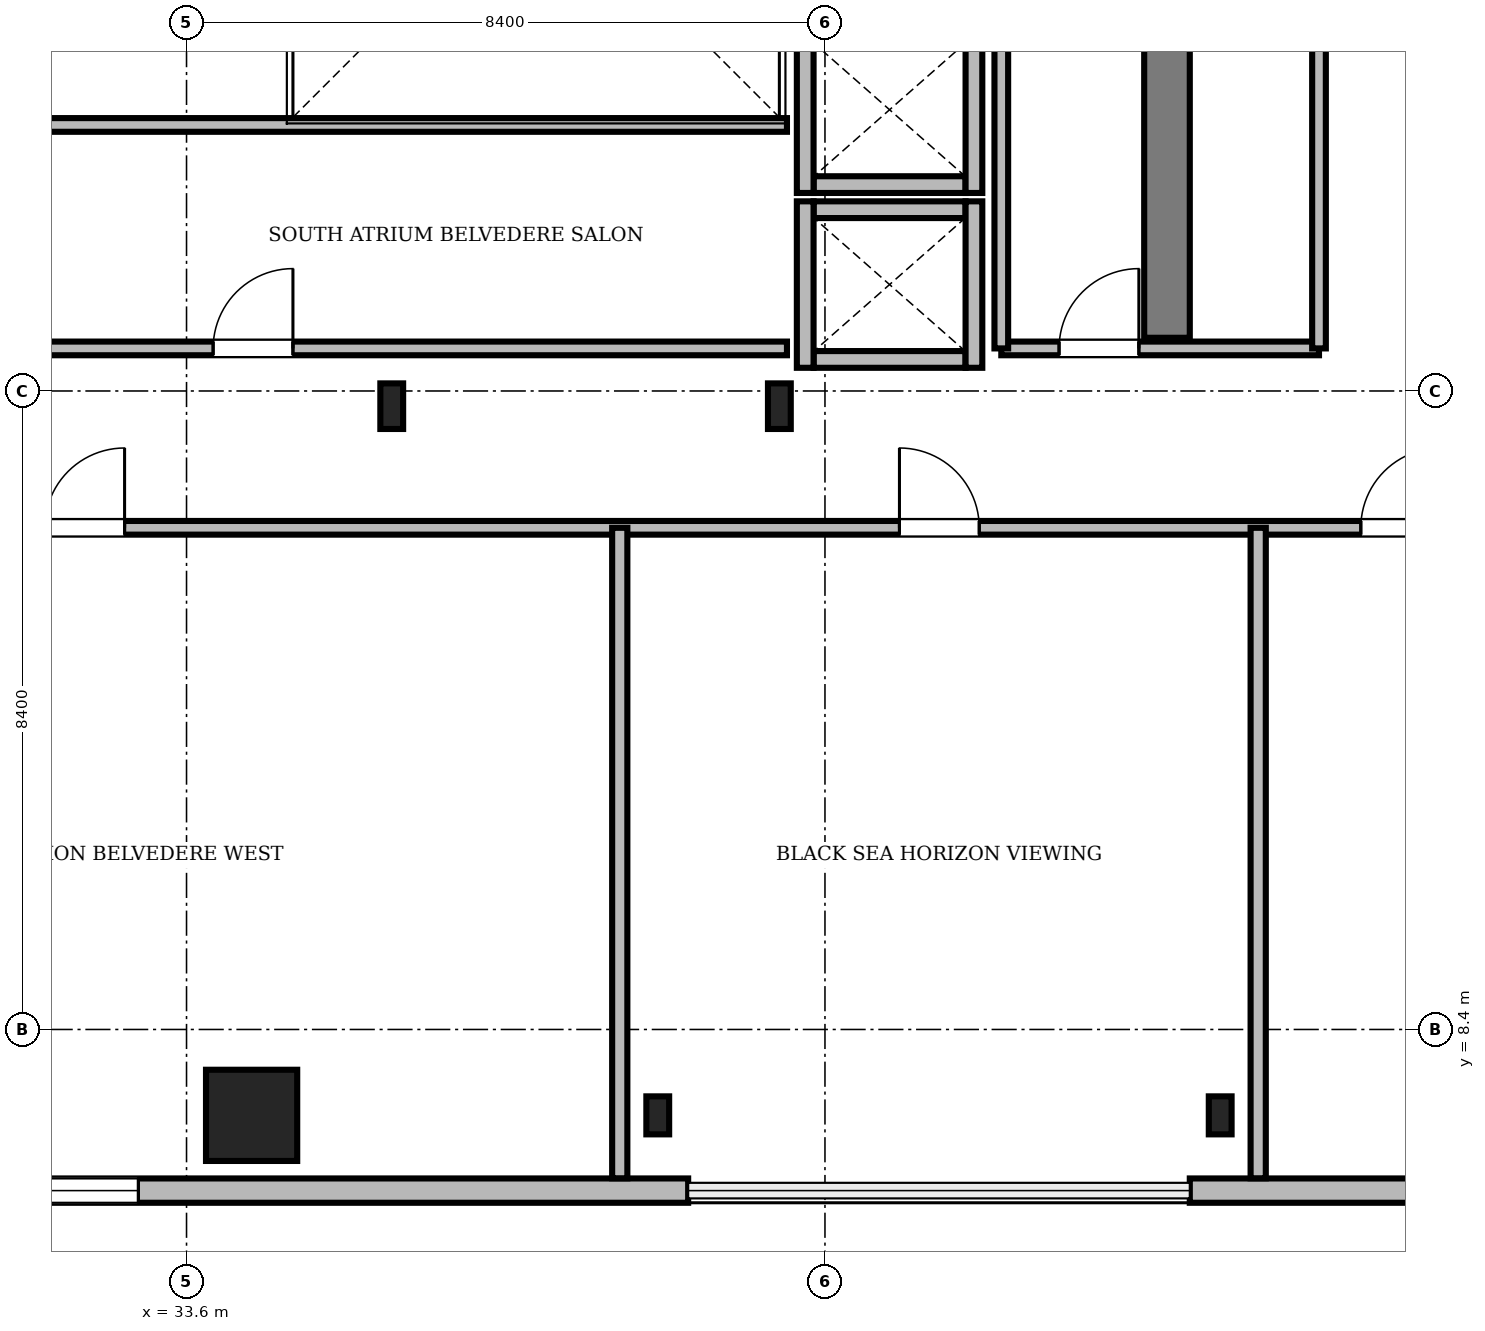
"""IFC4 building model, lengths in metres.
Left out: names, types, materials, properties, quantities, classifications, styles, units other than length and angle.
Written with IfcOpenShell. Run it as: python <this file> out.ifc"""

import sys

from ifc_helpers import new_model, si_unit, direction, frame, frame_2d, origin, origin_2d, place, context, subcontext, project, spatial, rectangle, i_section, extrude, source, transform, mapped, element, fill, save


model = new_model("IFC4")
c1 = context("Model", 3, precision=1e-05, world=origin(), true_north=direction((0.0, 1.0)))
c2 = subcontext(c1, "Body", "Model", "MODEL_VIEW")
j1 = project(units=[si_unit("LENGTHUNIT", "METRE"), si_unit("PLANEANGLEUNIT", "RADIAN")], contexts=[c1])
p1 = place(None, origin())
s1 = spatial("IfcSite", under=j1, at=p1, CompositionType="ELEMENT")
p2 = place(p1, origin())
s2 = spatial("IfcBuilding", under=s1, at=p2, CompositionType="ELEMENT")
p3 = place(p2, frame((0.0, 0.0, 286.15)))
s3 = spatial("IfcBuildingStorey", under=s2, at=p3, CompositionType="ELEMENT", Elevation=286.15)
m1 = source(origin(), c2, "Body", "SweptSolid", [
    extrude(rectangle(XDim=13.15, YDim=0.6, at=frame_2d((6.575, 0.0))), origin(), (0.0, 0.0, 1.0), 4.7),
])
p4 = place(p3, frame((46.5, 17.5, 0.0), z_axis=(0.0, 0.0, 1.0), x_axis=(0.0, 1.0, 0.0)))
e1 = element("IfcWall", 1, at=p4, inside=s3, PredefinedType="SHEAR", context=c2, shape_type="MappedRepresentation", body=[
    mapped(m1, transform((0.0, 0.0, 0.0), scale=1.0)),
])
m2 = source(origin(), c2, "Body", "SweptSolid", [
    extrude(i_section(OverallWidth=0.3, OverallDepth=0.6, WebThickness=0.015, FlangeThickness=0.03, FilletRadius=0.027, at=origin_2d()), origin(), (0.0, 0.0, 1.0), 4.7),
])
for number, where, z_axis, x_axis in (
    (2, (36.3, 16.6, 0.0), (0.0, 0.0, 1.0), (1.0, 0.0, 0.0)),
    (3, (41.4, 16.6, 0.0), (0.0, 0.0, 1.0), (1.0, 0.0, 0.0)),
):
    element("IfcColumn", number, at=place(p3, frame(where, z_axis=z_axis, x_axis=x_axis)), inside=s3, PredefinedType="COLUMN", context=c2, shape_type="MappedRepresentation", body=[
        mapped(m2, transform((0.0, 0.0, 0.0), scale=1.0)),
    ])
m3 = source(origin(), c2, "Body", "SweptSolid", [
    extrude(rectangle(XDim=1.2, YDim=1.2, at=origin_2d()), origin(), (0.0, 0.0, 1.0), 4.738),
])
p5 = place(p3, frame((34.456, 7.27, 0.0), z_axis=(0.053949820104, 0.113979944671, 0.992017131467), x_axis=(-0.90386260457, 0.427822851259, 0.0)))
e4 = element("IfcColumn", 4, at=p5, inside=s3, PredefinedType="COLUMN", context=c2, shape_type="MappedRepresentation", body=[
    mapped(m3, transform((0.0, 0.0, 0.0), scale=1.0)),
])
m4 = source(origin(), c2, "Body", "SweptSolid", [
    extrude(i_section(OverallWidth=0.3, OverallDepth=0.5, WebThickness=0.014, FlangeThickness=0.028, FilletRadius=0.027, at=origin_2d()), origin(), (0.0, 0.0, 1.0), 4.731),
])
for number, where, z_axis, x_axis in (
    (5, (39.8, 7.27, 0.0), (0.0, 0.114, 0.993), (-1.0, 0.0, 0.0)),
    (6, (47.2, 7.27, 0.0), (0.0, 0.114, 0.993), (-1.0, 0.0, 0.0)),
):
    element("IfcColumn", number, at=place(p3, frame(where, z_axis=z_axis, x_axis=x_axis)), inside=s3, PredefinedType="COLUMN", context=c2, shape_type="MappedRepresentation", body=[
        mapped(m4, transform((0.0, 0.0, 0.0), scale=1.0)),
    ])
m5 = source(origin(), c2, "Body", "SweptSolid", [
    extrude(rectangle(XDim=11.773, YDim=0.32, at=frame_2d((5.886, 0.0))), origin(), (0.0, 0.0, 1.0), 4.7),
])
p6 = place(p3, frame((28.427, 6.28, 0.0), z_axis=(0.0, 0.0, 1.0), x_axis=(1.0, 0.0, 0.0)))
e7 = element("IfcWall", 7, at=p6, inside=s3, PredefinedType="SOLIDWALL", context=c2, shape_type="MappedRepresentation", body=[
    mapped(m5, transform((0.0, 0.0, 0.0), scale=1.0)),
])
m6 = source(origin(), c2, "Body", "SweptSolid", [
    extrude(rectangle(XDim=2.4, YDim=3.2, at=frame_2d((1.2, 1.6))), frame((0.0, 0.17, 0.0), z_axis=(0.0, -1.0, 0.0), x_axis=(1.0, 0.0, 0.0)), (0.0, 0.0, 1.0), 0.34),
])
p7 = place(p6, frame((2.14, 0.0, 0.72)))
e8 = element("IfcOpeningElement", 8, at=p7, cuts=e7, PredefinedType="OPENING", context=c2, shape_type="MappedRepresentation", body=[
    mapped(m6, transform((0.0, 0.0, 0.0), scale=1.0)),
])
p8 = place(p3, frame((46.8, 6.28, 0.0), z_axis=(0.0, 0.0, 1.0), x_axis=(1.0, 0.0, 0.0)))
e9 = element("IfcWall", 9, at=p8, inside=s3, PredefinedType="SOLIDWALL", context=c2, shape_type="MappedRepresentation", body=[
    mapped(m5, transform((0.0, 0.0, 0.0), scale=1.0)),
])
p9 = place(p8, frame((7.233, 0.0, 0.72)))
e10 = element("IfcOpeningElement", 10, at=p9, cuts=e9, PredefinedType="OPENING", context=c2, shape_type="MappedRepresentation", body=[
    mapped(m6, transform((0.0, 0.0, 0.0), scale=1.0)),
])
m7 = source(origin(), c2, "Body", "SweptSolid", [
    extrude(rectangle(XDim=2.0, YDim=0.22, at=frame_2d((1.0, 0.0))), origin(), (0.0, 0.0, 1.0), 4.7),
])
p10 = place(p3, frame((41.85, 19.515, 0.0), z_axis=(0.0, 0.0, 1.0), x_axis=(1.0, 0.0, 0.0)))
e11 = element("IfcWall", 11, at=p10, inside=s3, PredefinedType="SOLIDWALL", context=c2, shape_type="MappedRepresentation", body=[
    mapped(m7, transform((0.0, 0.0, 0.0), scale=1.0)),
])
m8 = source(origin(), c2, "Body", "SweptSolid", [
    extrude(rectangle(XDim=2.19, YDim=0.22, at=frame_2d((1.095, 0.0))), origin(), (0.0, 0.0, 1.0), 4.7),
])
for number, where, z_axis, x_axis in (
    (12, (41.74, 19.405, 0.0), (0.0, 0.0, 1.0), (0.0, 1.0, 0.0)),
    (13, (43.96, 19.405, 0.0), (0.0, 0.0, 1.0), (0.0, 1.0, 0.0)),
):
    element("IfcWall", number, at=place(p3, frame(where, z_axis=z_axis, x_axis=x_axis)), inside=s3, PredefinedType="SOLIDWALL", context=c2, shape_type="MappedRepresentation", body=[
        mapped(m8, transform((0.0, 0.0, 0.0), scale=1.0)),
    ])
m9 = source(origin(), c2, "Body", "SweptSolid", [
    extrude(rectangle(XDim=2.0, YDim=0.22, at=frame_2d((1.0, 0.0))), origin(), (0.0, 0.0, 1.0), 4.142),
])
p11 = place(p3, frame((41.85, 17.215, 0.0), z_axis=(0.0, 0.0, 1.0), x_axis=(1.0, 0.0, 0.0)))
e14 = element("IfcWall", 14, at=p11, inside=s3, PredefinedType="SOLIDWALL", context=c2, shape_type="MappedRepresentation", body=[
    mapped(m9, transform((0.0, 0.0, 0.0), scale=1.0)),
])
m10 = source(origin(), c2, "Body", "SweptSolid", [
    extrude(rectangle(XDim=2.0, YDim=0.22, at=frame_2d((1.0, 0.0))), origin(), (0.0, 0.0, 1.0), 4.422),
])
p12 = place(p3, frame((41.85, 19.185, 0.0), z_axis=(0.0, 0.0, 1.0), x_axis=(1.0, 0.0, 0.0)))
e15 = element("IfcWall", 15, at=p12, inside=s3, PredefinedType="SOLIDWALL", context=c2, shape_type="MappedRepresentation", body=[
    mapped(m10, transform((0.0, 0.0, 0.0), scale=1.0)),
])
m11 = source(origin(), c2, "Body", "SweptSolid", [
    extrude(rectangle(XDim=2.19, YDim=0.22, at=frame_2d((1.095, 0.0))), origin(), (0.0, 0.0, 1.0), 4.422),
])
p13 = place(p3, frame((41.74, 17.105, 0.0), z_axis=(0.0, 0.0, 1.0), x_axis=(0.0, 1.0, 0.0)))
e16 = element("IfcWall", 16, at=p13, inside=s3, PredefinedType="SOLIDWALL", context=c2, shape_type="MappedRepresentation", body=[
    mapped(m11, transform((0.0, 0.0, 0.0), scale=1.0)),
])
m12 = source(origin(), c2, "Body", "SweptSolid", [
    extrude(rectangle(XDim=2.19, YDim=0.22, at=frame_2d((1.095, 0.0))), origin(), (0.0, 0.0, 1.0), 4.142),
])
p14 = place(p3, frame((43.96, 17.105, 0.0), z_axis=(0.0, 0.0, 1.0), x_axis=(0.0, 1.0, 0.0)))
e17 = element("IfcWall", 17, at=p14, inside=s3, PredefinedType="SOLIDWALL", context=c2, shape_type="MappedRepresentation", body=[
    mapped(m12, transform((0.0, 0.0, 0.0), scale=1.0)),
])
m13 = source(origin(), c2, "Body", "SweptSolid", [
    extrude(rectangle(XDim=25.558, YDim=0.18, at=frame_2d((12.779, 0.0))), origin(), (0.0, 0.0, 1.0), 3.942),
])
p15 = place(p3, frame((24.742, 15.0, 0.0), z_axis=(0.0, 0.0, 1.0), x_axis=(1.0, 0.0, 0.0)))
e18 = element("IfcWall", 18, at=p15, inside=s3, PredefinedType="PARTITIONING", context=c2, shape_type="MappedRepresentation", body=[
    mapped(m13, transform((0.0, 0.0, 0.0), scale=1.0)),
])
m14 = source(origin(), c2, "Body", "SweptSolid", [
    extrude(rectangle(XDim=1.05, YDim=2.2, at=frame_2d((0.525, 1.1))), frame((0.0, 0.1, 0.0), z_axis=(0.0, -1.0, 0.0), x_axis=(1.0, 0.0, 0.0)), (0.0, 0.0, 1.0), 0.2),
])
p16 = place(p15, frame((6.993, 0.0, 0.0)))
e19 = element("IfcOpeningElement", 19, at=p16, cuts=e18, PredefinedType="OPENING", context=c2, shape_type="MappedRepresentation", body=[
    mapped(m14, transform((0.0, 0.0, 0.0), scale=1.0)),
])
p17 = place(p15, frame((18.238, 0.0, 0.0)))
e20 = element("IfcOpeningElement", 20, at=p17, cuts=e18, PredefinedType="OPENING", context=c2, shape_type="MappedRepresentation", body=[
    mapped(m14, transform((0.0, 0.0, 0.0), scale=1.0)),
])
p18 = place(p15, frame((24.308, 0.0, 0.0)))
e21 = element("IfcOpeningElement", 21, at=p18, cuts=e18, PredefinedType="OPENING", context=c2, shape_type="MappedRepresentation", body=[
    mapped(m14, transform((0.0, 0.0, 0.0), scale=1.0)),
])
m15 = source(origin(), c2, "Body", "SweptSolid", [
    extrude(rectangle(XDim=10.803, YDim=0.18, at=frame_2d((5.401, 0.0))), origin(), (0.0, 0.0, 1.0), 4.242),
])
p19 = place(p3, frame((30.697, 17.36, 0.0), z_axis=(0.0, 0.0, 1.0), x_axis=(1.0, 0.0, 0.0)))
e22 = element("IfcWall", 22, at=p19, inside=s3, PredefinedType="PARTITIONING", context=c2, shape_type="MappedRepresentation", body=[
    mapped(m15, transform((0.0, 0.0, 0.0), scale=1.0)),
])
p20 = place(p19, frame((3.253, 0.0, 0.0)))
e23 = element("IfcOpeningElement", 23, at=p20, cuts=e22, PredefinedType="OPENING", context=c2, shape_type="MappedRepresentation", body=[
    mapped(m14, transform((0.0, 0.0, 0.0), scale=1.0)),
])
m16 = source(origin(), c2, "Body", "SweptSolid", [
    extrude(rectangle(XDim=4.18, YDim=0.18, at=frame_2d((2.09, 0.0))), origin(), (0.0, 0.0, 1.0), 4.142),
])
p21 = place(p3, frame((44.32, 17.36, 0.0), z_axis=(0.0, 0.0, 1.0), x_axis=(1.0, 0.0, 0.0)))
e24 = element("IfcWall", 24, at=p21, inside=s3, PredefinedType="PARTITIONING", context=c2, shape_type="MappedRepresentation", body=[
    mapped(m16, transform((0.0, 0.0, 0.0), scale=1.0)),
])
p22 = place(p21, frame((0.76, 0.0, 0.0)))
e25 = element("IfcOpeningElement", 25, at=p22, cuts=e24, PredefinedType="OPENING", context=c2, shape_type="MappedRepresentation", body=[
    mapped(m14, transform((0.0, 0.0, 0.0), scale=1.0)),
])
p23 = place(p3, frame((30.697, 20.3, 0.0), z_axis=(0.0, 0.0, 1.0), x_axis=(1.0, 0.0, 0.0)))
e26 = element("IfcWall", 26, at=p23, inside=s3, PredefinedType="PARTITIONING", context=c2, shape_type="MappedRepresentation", body=[
    mapped(m15, transform((0.0, 0.0, 0.0), scale=1.0)),
])
m17 = source(origin(), c2, "Body", "SweptSolid", [
    extrude(rectangle(XDim=8.558, YDim=0.2, at=frame_2d((4.279, 0.0))), origin(), (0.0, 0.0, 1.0), 3.942),
])
for number, where, z_axis, x_axis in (
    (27, (39.3, 6.442, 0.0), (0.0, 0.0, 1.0), (0.0, 1.0, 0.0)),
    (28, (47.7, 6.442, 0.0), (0.0, 0.0, 1.0), (0.0, 1.0, 0.0)),
):
    element("IfcWall", number, at=place(p3, frame(where, z_axis=z_axis, x_axis=x_axis)), inside=s3, PredefinedType="PARTITIONING", context=c2, shape_type="MappedRepresentation", body=[
        mapped(m17, transform((0.0, 0.0, 0.0), scale=1.0)),
    ])
m18 = source(origin(), c2, "Body", "SweptSolid", [
    extrude(rectangle(XDim=6.788, YDim=0.18, at=frame_2d((3.394, 0.0))), origin(), (0.0, 0.0, 1.0), 4.142),
])
p24 = place(p3, frame((44.32, 17.36, 0.0), z_axis=(0.0, 0.0, 1.0), x_axis=(0.0, 1.0, 0.0)))
e29 = element("IfcWall", 29, at=p24, inside=s3, PredefinedType="PARTITIONING", context=c2, shape_type="MappedRepresentation", body=[
    mapped(m18, transform((0.0, 0.0, 0.0), scale=1.0)),
])
m19 = source(origin(), c2, "Body", "SweptSolid", [
    extrude(rectangle(XDim=6.84, YDim=0.18, at=frame_2d((3.42, 0.0))), origin(), (0.0, 0.0, 1.0), 4.142),
])
p25 = place(p3, frame((48.5, 17.36, 0.0), z_axis=(0.0, 0.0, 1.0), x_axis=(0.0, 1.0, 0.0)))
e30 = element("IfcWall", 30, at=p25, inside=s3, PredefinedType="PARTITIONING", context=c2, shape_type="MappedRepresentation", body=[
    mapped(m19, transform((0.0, 0.0, 0.0), scale=1.0)),
])
m20 = source(origin(), c2, "Body", "SweptSolid", [
    extrude(rectangle(XDim=2.4, YDim=3.2, at=frame_2d((1.2, 1.6))), frame((0.0, 0.03, 0.0), z_axis=(0.0, -1.0, 0.0), x_axis=(1.0, 0.0, 0.0)), (0.0, 0.0, 1.0), 0.06),
])
p26 = place(p7, origin())
e31 = element("IfcWindow", 31, at=p26, inside=s3, PartitioningType="SINGLE_PANEL", PredefinedType="WINDOW", context=c2, shape_type="MappedRepresentation", body=[
    mapped(m20, transform((0.0, 0.0, 0.0), scale=1.0)),
])
fill(e8, e31)
m21 = source(origin(), c2, "Body", "SweptSolid", [
    extrude(rectangle(XDim=1.05, YDim=2.2, at=frame_2d((0.525, 1.1))), frame((0.0, 0.025, 0.0), z_axis=(0.0, -1.0, 0.0), x_axis=(1.0, 0.0, 0.0)), (0.0, 0.0, 1.0), 0.05),
])
p27 = place(p16, origin())
e32 = element("IfcDoor", 32, at=p27, inside=s3, OperationType="SINGLE_SWING_RIGHT", PredefinedType="DOOR", context=c2, shape_type="MappedRepresentation", body=[
    mapped(m21, transform((0.0, 0.0, 0.0), scale=1.0)),
])
fill(e19, e32)
p28 = place(p17, origin())
e33 = element("IfcDoor", 33, at=p28, inside=s3, OperationType="SINGLE_SWING_LEFT", PredefinedType="DOOR", context=c2, shape_type="MappedRepresentation", body=[
    mapped(m21, transform((0.0, 0.0, 0.0), scale=1.0)),
])
fill(e20, e33)
p29 = place(p18, origin())
e34 = element("IfcDoor", 34, at=p29, inside=s3, OperationType="SINGLE_SWING_RIGHT", PredefinedType="DOOR", context=c2, shape_type="MappedRepresentation", body=[
    mapped(m21, transform((0.0, 0.0, 0.0), scale=1.0)),
])
fill(e21, e34)
p30 = place(p20, origin())
e35 = element("IfcDoor", 35, at=p30, inside=s3, OperationType="SINGLE_SWING_RIGHT", PredefinedType="DOOR", context=c2, shape_type="MappedRepresentation", body=[
    mapped(m21, transform((0.0, 0.0, 0.0), scale=1.0)),
])
fill(e23, e35)
p31 = place(p22, origin())
e36 = element("IfcDoor", 36, at=p31, inside=s3, OperationType="SINGLE_SWING_RIGHT", PredefinedType="DOOR", context=c2, shape_type="MappedRepresentation", body=[
    mapped(m21, transform((0.0, 0.0, 0.0), scale=1.0)),
])
fill(e25, e36)
save(model, sys.argv[1])
